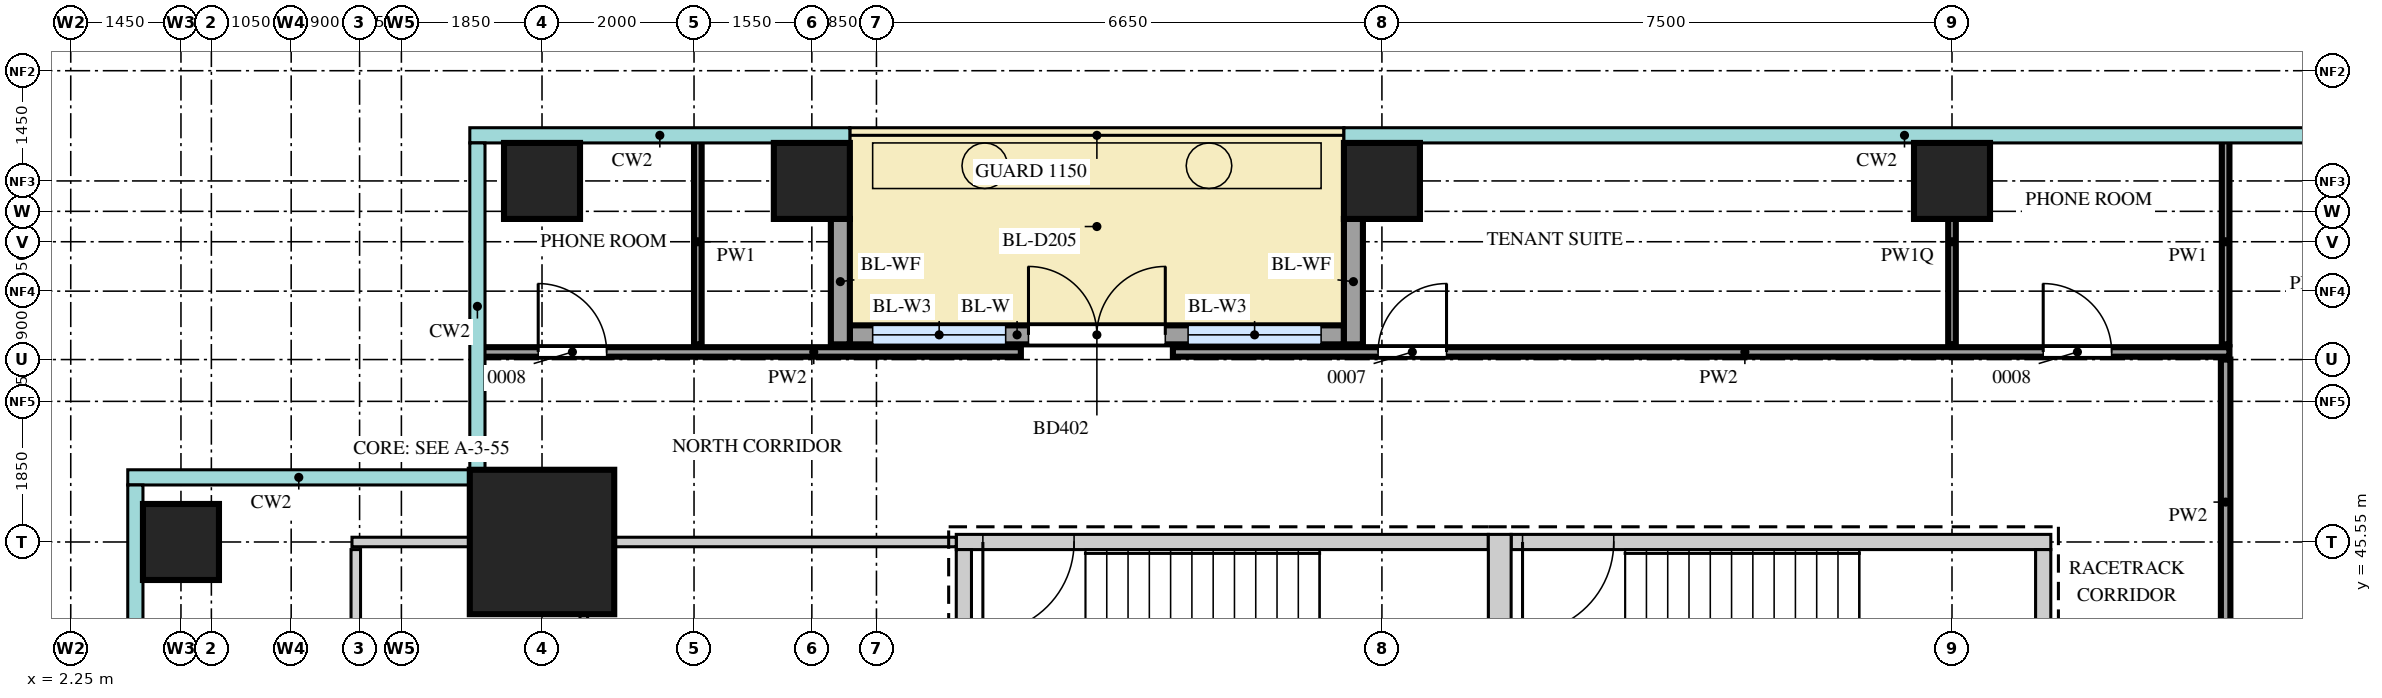
"""IFC4 building model, lengths in metres.
Left out: names, types, materials, properties, quantities, classifications, styles, units other than length and angle.
Written with IfcOpenShell. Run it as: python <this file> out.ifc"""

import sys

from ifc_helpers import new_model, si_unit, direction, frame, frame_2d, origin, origin_2d, place, context, subcontext, project, spatial, rectangle, extrude, source, transform, mapped, element, fill, save


model = new_model("IFC4")
c1 = context("Model", 3, precision=1e-05, world=origin(), true_north=direction((0.0, 1.0)))
c2 = subcontext(c1, "Body", "Model", "MODEL_VIEW")
j1 = project(units=[si_unit("LENGTHUNIT", "METRE"), si_unit("PLANEANGLEUNIT", "RADIAN")], contexts=[c1])
p1 = place(None, origin())
s1 = spatial("IfcSite", under=j1, at=p1, CompositionType="ELEMENT")
p2 = place(p1, origin())
s2 = spatial("IfcBuilding", under=s1, at=p2, CompositionType="ELEMENT")
p3 = place(p2, frame((0.0, 0.0, 184.7)))
s3 = spatial("IfcBuildingStorey", under=s2, at=p3, CompositionType="ELEMENT", Elevation=184.7)
m1 = source(origin(), c2, "Body", "SweptSolid", [
    extrude(rectangle(XDim=7.0, YDim=0.2, at=frame_2d((3.5, 0.0))), origin(), (0.0, 0.0, 1.0), 3.75),
])
p4 = place(p3, frame((13.9, 45.55, 0.0), z_axis=(0.0, 0.0, 1.0), x_axis=(1.0, 0.0, 0.0)))
e1 = element("IfcWall", 1, at=p4, inside=s3, PredefinedType="SHEAR", context=c2, shape_type="MappedRepresentation", body=[
    mapped(m1, transform((0.0, 0.0, 0.0))),
])
m2 = source(origin(), c2, "Body", "SweptSolid", [
    extrude(rectangle(XDim=1.2, YDim=2.1, at=frame_2d((0.6, 1.05))), frame((0.0, 0.11, 0.0), z_axis=(0.0, -1.0, 0.0), x_axis=(1.0, 0.0, 0.0)), (0.0, 0.0, 1.0), 0.22),
])
p5 = place(p4, frame((0.35, 0.0, 0.0)))
e2 = element("IfcOpeningElement", 2, at=p5, cuts=e1, PredefinedType="OPENING", context=c2, shape_type="MappedRepresentation", body=[
    mapped(m2, transform((0.0, 0.0, 0.0))),
])
m3 = source(origin(), c2, "Body", "SweptSolid", [
    extrude(rectangle(XDim=7.1, YDim=0.2, at=frame_2d((3.55, 0.0))), origin(), (0.0, 0.0, 1.0), 3.75),
])
p6 = place(p3, frame((21.2, 45.55, 0.0), z_axis=(0.0, 0.0, 1.0), x_axis=(1.0, 0.0, 0.0)))
e3 = element("IfcWall", 3, at=p6, inside=s3, PredefinedType="SHEAR", context=c2, shape_type="MappedRepresentation", body=[
    mapped(m3, transform((0.0, 0.0, 0.0))),
])
p7 = place(p6, frame((0.15, 0.0, 0.0)))
e4 = element("IfcOpeningElement", 4, at=p7, cuts=e3, PredefinedType="OPENING", context=c2, shape_type="MappedRepresentation", body=[
    mapped(m2, transform((0.0, 0.0, 0.0))),
])
m4 = source(origin(), c2, "Body", "SweptSolid", [
    extrude(rectangle(XDim=3.75, YDim=0.3, at=frame_2d((1.875, 0.0))), origin(), (0.0, 0.0, 1.0), 3.75),
])
p8 = place(p3, frame((21.05, 41.9, 0.0), z_axis=(0.0, 0.0, 1.0), x_axis=(0.0, 1.0, 0.0)))
e5 = element("IfcWall", 5, at=p8, inside=s3, PredefinedType="SHEAR", context=c2, shape_type="MappedRepresentation", body=[
    mapped(m4, transform((0.0, 0.0, 0.0))),
])
m5 = source(origin(), c2, "Body", "SweptSolid", [
    extrude(rectangle(XDim=3.35, YDim=0.2, at=frame_2d((1.675, 0.0))), origin(), (0.0, 0.0, 1.0), 3.75),
])
for number, where, z_axis, x_axis in (
    (6, (14.0, 42.1, 0.0), (0.0, 0.0, 1.0), (0.0, 1.0, 0.0)),
    (7, (28.2, 42.1, 0.0), (0.0, 0.0, 1.0), (0.0, 1.0, 0.0)),
):
    element("IfcWall", number, at=place(p3, frame(where, z_axis=z_axis, x_axis=x_axis)), inside=s3, PredefinedType="SHEAR", context=c2, shape_type="MappedRepresentation", body=[
        mapped(m5, transform((0.0, 0.0, 0.0))),
    ])
m6 = source(origin(), c2, "Body", "SweptSolid", [
    extrude(rectangle(XDim=1.9, YDim=1.9, at=origin_2d()), origin(), (0.0, 0.0, 1.0), 4.0),
])
p9 = place(p3, frame((8.45, 45.55, 0.0), z_axis=(0.0, 0.0, 1.0), x_axis=(1.0, 0.0, 0.0)))
e8 = element("IfcColumn", 8, at=p9, inside=s3, PredefinedType="COLUMN", context=c2, shape_type="MappedRepresentation", body=[
    mapped(m6, transform((0.0, 0.0, 0.0))),
])
m7 = source(origin(), c2, "Body", "SweptSolid", [
    extrude(rectangle(XDim=1.0, YDim=1.0, at=origin_2d()), origin(), (0.0, 0.0, 1.0), 3.75),
])
for number, where, z_axis, x_axis in (
    (9, (8.45, 50.3, 0.0), (0.0, 0.0, 1.0), (1.0, 0.0, 0.0)),
    (10, (12.0, 50.3, 0.0), (0.0, 0.0, 1.0), (1.0, 0.0, 0.0)),
    (11, (19.5, 50.3, 0.0), (0.0, 0.0, 1.0), (1.0, 0.0, 0.0)),
    (12, (27.0, 50.3, 0.0), (0.0, 0.0, 1.0), (1.0, 0.0, 0.0)),
    (13, (3.7, 45.55, 0.0), (0.0, 0.0, 1.0), (1.0, 0.0, 0.0)),
):
    element("IfcColumn", number, at=place(p3, frame(where, z_axis=z_axis, x_axis=x_axis)), inside=s3, PredefinedType="COLUMN", context=c2, shape_type="MappedRepresentation", body=[
        mapped(m7, transform((0.0, 0.0, 0.0))),
    ])
m8 = source(origin(), c2, "Body", "SweptSolid", [
    extrude(rectangle(XDim=6.5, YDim=0.25, at=frame_2d((3.25, 0.0))), origin(), (0.0, 0.0, 1.0), 3.75),
])
p10 = place(p3, frame((12.5, 48.275, 0.0), z_axis=(0.0, 0.0, 1.0), x_axis=(1.0, 0.0, 0.0)))
e14 = element("IfcWall", 14, at=p10, inside=s3, PredefinedType="SOLIDWALL", context=c2, shape_type="MappedRepresentation", body=[
    mapped(m8, transform((0.0, 0.0, 0.0))),
])
m9 = source(origin(), c2, "Body", "SweptSolid", [
    extrude(rectangle(XDim=1.75, YDim=2.4, at=frame_2d((0.875, 1.2))), frame((0.0, 0.135, 0.0), z_axis=(0.0, -1.0, 0.0), x_axis=(1.0, 0.0, 0.0)), (0.0, 0.0, 1.0), 0.27),
])
p11 = place(p10, frame((0.3, 0.0, 0.0)))
e15 = element("IfcOpeningElement", 15, at=p11, cuts=e14, PredefinedType="OPENING", context=c2, shape_type="MappedRepresentation", body=[
    mapped(m9, transform((0.0, 0.0, 0.0))),
])
p12 = place(p10, frame((4.45, 0.0, 0.0)))
e16 = element("IfcOpeningElement", 16, at=p12, cuts=e14, PredefinedType="OPENING", context=c2, shape_type="MappedRepresentation", body=[
    mapped(m9, transform((0.0, 0.0, 0.0))),
])
m10 = source(origin(), c2, "Body", "SweptSolid", [
    extrude(rectangle(XDim=1.8, YDim=2.4, at=frame_2d((0.9, 1.2))), frame((0.0, 0.135, 0.0), z_axis=(0.0, -1.0, 0.0), x_axis=(1.0, 0.0, 0.0)), (0.0, 0.0, 1.0), 0.27),
])
p13 = place(p10, frame((2.35, 0.0, 0.0)))
e17 = element("IfcOpeningElement", 17, at=p13, cuts=e14, PredefinedType="OPENING", context=c2, shape_type="MappedRepresentation", body=[
    mapped(m10, transform((0.0, 0.0, 0.0))),
])
m11 = source(origin(), c2, "Body", "SweptSolid", [
    extrude(rectangle(XDim=1.65, YDim=0.25, at=frame_2d((0.825, 0.0))), origin(), (0.0, 0.0, 1.0), 3.45),
])
for number, where, z_axis, x_axis in (
    (18, (12.375, 49.8, 0.0), (0.0, 0.0, 1.0), (0.0, -1.0, 0.0)),
    (19, (19.125, 49.8, 0.0), (0.0, 0.0, 1.0), (0.0, -1.0, 0.0)),
):
    element("IfcWall", number, at=place(p3, frame(where, z_axis=z_axis, x_axis=x_axis)), inside=s3, PredefinedType="SOLIDWALL", context=c2, shape_type="MappedRepresentation", body=[
        mapped(m11, transform((0.0, 0.0, 0.0))),
    ])
m12 = source(origin(), c2, "Body", "SweptSolid", [
    extrude(rectangle(XDim=8.35, YDim=0.125, at=frame_2d((4.175, 0.0))), origin(), (0.0, 0.0, 1.0), 3.8),
])
p14 = place(p3, frame((30.6, 39.6, 0.0), z_axis=(0.0, 0.0, 1.0), x_axis=(0.0, 1.0, 0.0)))
e20 = element("IfcWall", 20, at=p14, inside=s3, PredefinedType="PARTITIONING", context=c2, shape_type="MappedRepresentation", body=[
    mapped(m12, transform((0.0, 0.0, 0.0))),
])
m13 = source(origin(), c2, "Body", "SweptSolid", [
    extrude(rectangle(XDim=0.9, YDim=2.1, at=frame_2d((0.45, 1.05))), frame((0.0, 0.073, 0.0), z_axis=(0.0, -1.0, 0.0), x_axis=(1.0, 0.0, 0.0)), (0.0, 0.0, 1.0), 0.145),
])
p15 = place(p14, frame((3.7, 0.0, 0.0)))
e21 = element("IfcOpeningElement", 21, at=p15, cuts=e20, PredefinedType="OPENING", context=c2, shape_type="MappedRepresentation", body=[
    mapped(m13, transform((0.0, 0.0, 0.0))),
])
m14 = source(origin(), c2, "Body", "SweptSolid", [
    extrude(rectangle(XDim=3.45, YDim=0.125, at=frame_2d((1.725, 0.0))), origin(), (0.0, 0.0, 1.0), 3.8),
])
p16 = place(p3, frame((6.0, 42.0, 0.0), z_axis=(0.0, 0.0, 1.0), x_axis=(0.0, 1.0, 0.0)))
e22 = element("IfcWall", 22, at=p16, inside=s3, PredefinedType="PARTITIONING", context=c2, shape_type="MappedRepresentation", body=[
    mapped(m14, transform((0.0, 0.0, 0.0))),
])
p17 = place(p16, frame((1.15, 0.0, 0.0)))
e23 = element("IfcOpeningElement", 23, at=p17, cuts=e22, PredefinedType="OPENING", context=c2, shape_type="MappedRepresentation", body=[
    mapped(m13, transform((0.0, 0.0, 0.0))),
])
m15 = source(origin(), c2, "Body", "SweptSolid", [
    extrude(rectangle(XDim=3.45, YDim=0.1, at=frame_2d((1.725, 0.0))), origin(), (0.0, 0.0, 1.0), 3.8),
])
p18 = place(p3, frame((9.0, 42.0, 0.0), z_axis=(0.0, 0.0, 1.0), x_axis=(0.0, 1.0, 0.0)))
e24 = element("IfcWall", 24, at=p18, inside=s3, PredefinedType="PARTITIONING", context=c2, shape_type="MappedRepresentation", body=[
    mapped(m15, transform((0.0, 0.0, 0.0))),
])
m16 = source(origin(), c2, "Body", "SweptSolid", [
    extrude(rectangle(XDim=7.95, YDim=0.125, at=frame_2d((3.975, 0.0))), origin(), (0.0, 0.0, 1.0), 3.25),
])
p19 = place(p3, frame((5.95, 45.55, 0.0), z_axis=(0.0, 0.0, 1.0), x_axis=(1.0, 0.0, 0.0)))
e25 = element("IfcWall", 25, at=p19, inside=s3, PredefinedType="PARTITIONING", context=c2, shape_type="MappedRepresentation", body=[
    mapped(m16, transform((0.0, 0.0, 0.0))),
])
m17 = source(origin(), c2, "Body", "SweptSolid", [
    extrude(rectangle(XDim=2.7, YDim=0.1, at=frame_2d((1.35, 0.0))), origin(), (0.0, 0.0, 1.0), 3.8),
])
p20 = place(p3, frame((10.5, 48.15, 0.0), z_axis=(0.0, 0.0, 1.0), x_axis=(0.0, 1.0, 0.0)))
e26 = element("IfcWall", 26, at=p20, inside=s3, PredefinedType="PARTITIONING", context=c2, shape_type="MappedRepresentation", body=[
    mapped(m17, transform((0.0, 0.0, 0.0))),
])
m18 = source(origin(), c2, "Body", "SweptSolid", [
    extrude(rectangle(XDim=2.7, YDim=0.1, at=frame_2d((1.35, 0.0))), origin(), (0.0, 0.0, 1.0), 3.42),
])
p21 = place(p3, frame((27.0, 48.15, 0.0), z_axis=(0.0, 0.0, 1.0), x_axis=(0.0, 1.0, 0.0)))
e27 = element("IfcWall", 27, at=p21, inside=s3, PredefinedType="PARTITIONING", context=c2, shape_type="MappedRepresentation", body=[
    mapped(m18, transform((0.0, 0.0, 0.0))),
])
p22 = place(p3, frame((30.6, 48.15, 0.0), z_axis=(0.0, 0.0, 1.0), x_axis=(0.0, 1.0, 0.0)))
e28 = element("IfcWall", 28, at=p22, inside=s3, PredefinedType="PARTITIONING", context=c2, shape_type="MappedRepresentation", body=[
    mapped(m17, transform((0.0, 0.0, 0.0))),
])
m19 = source(origin(), c2, "Body", "SweptSolid", [
    extrude(rectangle(XDim=7.1, YDim=0.125, at=frame_2d((3.55, 0.0))), origin(), (0.0, 0.0, 1.0), 3.8),
])
p23 = place(p3, frame((7.65, 48.05, 0.0), z_axis=(0.0, 0.0, 1.0), x_axis=(1.0, 0.0, 0.0)))
e29 = element("IfcWall", 29, at=p23, inside=s3, PredefinedType="PARTITIONING", context=c2, shape_type="MappedRepresentation", body=[
    mapped(m19, transform((0.0, 0.0, 0.0))),
])
p24 = place(p23, frame((0.75, 0.0, 0.0)))
e30 = element("IfcOpeningElement", 30, at=p24, cuts=e29, PredefinedType="OPENING", context=c2, shape_type="MappedRepresentation", body=[
    mapped(m13, transform((0.0, 0.0, 0.0))),
])
m20 = source(origin(), c2, "Body", "SweptSolid", [
    extrude(rectangle(XDim=13.9, YDim=0.125, at=frame_2d((6.95, 0.0))), origin(), (0.0, 0.0, 1.0), 3.8),
])
p25 = place(p3, frame((16.75, 48.05, 0.0), z_axis=(0.0, 0.0, 1.0), x_axis=(1.0, 0.0, 0.0)))
e31 = element("IfcWall", 31, at=p25, inside=s3, PredefinedType="PARTITIONING", context=c2, shape_type="MappedRepresentation", body=[
    mapped(m20, transform((0.0, 0.0, 0.0))),
])
p26 = place(p25, frame((2.7, 0.0, 0.0)))
e32 = element("IfcOpeningElement", 32, at=p26, cuts=e31, PredefinedType="OPENING", context=c2, shape_type="MappedRepresentation", body=[
    mapped(m13, transform((0.0, 0.0, 0.0))),
])
p27 = place(p25, frame((11.45, 0.0, 0.0)))
e33 = element("IfcOpeningElement", 33, at=p27, cuts=e31, PredefinedType="OPENING", context=c2, shape_type="MappedRepresentation", body=[
    mapped(m13, transform((0.0, 0.0, 0.0))),
])
m21 = source(origin(), c2, "Body", "SweptSolid", [
    extrude(rectangle(XDim=1.75, YDim=2.4, at=frame_2d((0.875, 1.2))), frame((0.0, 0.03, 0.0), z_axis=(0.0, -1.0, 0.0), x_axis=(1.0, 0.0, 0.0)), (0.0, 0.0, 1.0), 0.06),
])
p28 = place(p11, origin())
e34 = element("IfcWindow", 34, at=p28, inside=s3, PartitioningType="SINGLE_PANEL", PredefinedType="WINDOW", context=c2, shape_type="MappedRepresentation", body=[
    mapped(m21, transform((0.0, 0.0, 0.0))),
])
fill(e15, e34)
p29 = place(p12, origin())
e35 = element("IfcWindow", 35, at=p29, inside=s3, PartitioningType="SINGLE_PANEL", PredefinedType="WINDOW", context=c2, shape_type="MappedRepresentation", body=[
    mapped(m21, transform((0.0, 0.0, 0.0))),
])
fill(e16, e35)
m22 = source(origin(), c2, "Body", "SweptSolid", [
    extrude(rectangle(XDim=1.8, YDim=2.4, at=frame_2d((0.9, 1.2))), frame((0.0, 0.025, 0.0), z_axis=(0.0, -1.0, 0.0), x_axis=(1.0, 0.0, 0.0)), (0.0, 0.0, 1.0), 0.05),
])
p30 = place(p13, origin())
e36 = element("IfcDoor", 36, at=p30, inside=s3, OperationType="DOUBLE_DOOR_DOUBLE_SWING", PredefinedType="DOOR", context=c2, shape_type="MappedRepresentation", body=[
    mapped(m22, transform((0.0, 0.0, 0.0))),
])
fill(e17, e36)
m23 = source(origin(), c2, "Body", "SweptSolid", [
    extrude(rectangle(XDim=0.9, YDim=2.1, at=frame_2d((0.45, 1.05))), frame((0.0, 0.025, 0.0), z_axis=(0.0, -1.0, 0.0), x_axis=(1.0, 0.0, 0.0)), (0.0, 0.0, 1.0), 0.05),
])
p31 = place(p24, origin())
e37 = element("IfcDoor", 37, at=p31, inside=s3, OperationType="SINGLE_SWING_RIGHT", PredefinedType="DOOR", context=c2, shape_type="MappedRepresentation", body=[
    mapped(m23, transform((0.0, 0.0, 0.0))),
])
fill(e30, e37)
p32 = place(p26, origin())
e38 = element("IfcDoor", 38, at=p32, inside=s3, OperationType="SINGLE_SWING_LEFT", PredefinedType="DOOR", context=c2, shape_type="MappedRepresentation", body=[
    mapped(m23, transform((0.0, 0.0, 0.0))),
])
fill(e32, e38)
p33 = place(p27, origin())
e39 = element("IfcDoor", 39, at=p33, inside=s3, OperationType="SINGLE_SWING_RIGHT", PredefinedType="DOOR", context=c2, shape_type="MappedRepresentation", body=[
    mapped(m23, transform((0.0, 0.0, 0.0))),
])
fill(e33, e39)
m24 = source(origin(), c2, "Body", "SweptSolid", [
    extrude(rectangle(XDim=1.2, YDim=2.1, at=frame_2d((0.6, 1.05))), frame((0.0, 0.025, 0.0), z_axis=(0.0, -1.0, 0.0), x_axis=(1.0, 0.0, 0.0)), (0.0, 0.0, 1.0), 0.05),
])
p34 = place(p5, origin())
e40 = element("IfcDoor", 40, at=p34, inside=s3, OperationType="SINGLE_SWING_LEFT", PredefinedType="DOOR", context=c2, shape_type="MappedRepresentation", body=[
    mapped(m24, transform((0.0, 0.0, 0.0))),
])
fill(e2, e40)
p35 = place(p7, origin())
e41 = element("IfcDoor", 41, at=p35, inside=s3, OperationType="SINGLE_SWING_LEFT", PredefinedType="DOOR", context=c2, shape_type="MappedRepresentation", body=[
    mapped(m24, transform((0.0, 0.0, 0.0))),
])
fill(e4, e41)
save(model, sys.argv[1])
